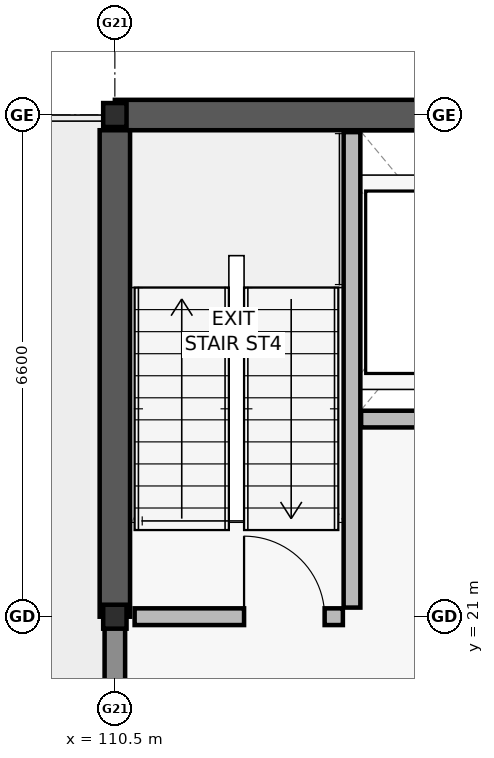
"""IFC4 building model, lengths in metres.
Left out: names, types, materials, properties, quantities, classifications, styles, units other than length and angle.
Written with IfcOpenShell. Run it as: python <this file> out.ifc"""

import sys

from ifc_helpers import new_model, si_unit, direction, frame, frame_2d, origin, origin_2d, place, context, subcontext, project, spatial, rectangle, i_section, extrude, element, fill, save


model = new_model("IFC4")
c1 = context("Model", 3, precision=1e-05, world=origin(), true_north=direction((0.0, 1.0)))
c2 = subcontext(c1, "Body", "Model", "MODEL_VIEW")
j1 = project(units=[si_unit("LENGTHUNIT", "METRE"), si_unit("PLANEANGLEUNIT", "RADIAN")], contexts=[c1])
p1 = place(None, origin())
s1 = spatial("IfcSite", under=j1, at=p1, CompositionType="ELEMENT")
p2 = place(p1, origin())
s2 = spatial("IfcBuilding", under=s1, at=p2, CompositionType="ELEMENT")
p3 = place(p2, frame((0.0, 0.0, 13.5)))
s3 = spatial("IfcBuildingStorey", under=s2, at=p3, CompositionType="ELEMENT", Elevation=13.5)
for number, where, z_axis, x_axis in (
    (1, (110.5, 21.0, 0.0), (0.0, 0.0, 1.0), (1.0, 0.0, 0.0)),
    (2, (110.5, 27.6, 0.0), (0.0, 0.0, 1.0), (1.0, 0.0, 0.0)),
):
    element("IfcColumn", number, at=place(p3, frame(where, z_axis=z_axis, x_axis=x_axis)), inside=s3, PredefinedType="COLUMN", context=c2, shape_type="SweptSolid", body=[
        extrude(i_section(OverallWidth=0.307, OverallDepth=0.315, WebThickness=0.012, FlangeThickness=0.019, FilletRadius=0.017, at=origin_2d()), origin(), (0.0, 0.0, 1.0), 3.9),
    ])
p4 = place(p3, frame((110.5, 27.6, 0.0), z_axis=(0.0, 0.0, 1.0), x_axis=(1.0, 0.0, 0.0)))
e3 = element("IfcWall", 3, at=p4, inside=s3, PredefinedType="SHEAR", context=c2, shape_type="SweptSolid", body=[
    extrude(rectangle(XDim=6.5, YDim=0.4, at=frame_2d((3.25, 0.0))), origin(), (0.0, 0.0, 1.0), 3.66),
])
p5 = place(p3, frame((110.5, 21.0, 0.0), z_axis=(0.0, 0.0, 1.0), x_axis=(0.0, 1.0, 0.0)))
e4 = element("IfcWall", 4, at=p5, inside=s3, PredefinedType="SHEAR", context=c2, shape_type="SweptSolid", body=[
    extrude(rectangle(XDim=6.4, YDim=0.4, at=frame_2d((3.2, 0.0))), origin(), (0.0, 0.0, 1.0), 3.66),
])
p6 = place(p3, frame((110.5, 14.405, 0.0), z_axis=(0.0, 0.0, 1.0), x_axis=(0.0, 1.0, 0.0)))
e5 = element("IfcWall", 5, at=p6, inside=s3, PredefinedType="SOLIDWALL", context=c2, shape_type="SweptSolid", body=[
    extrude(rectangle(XDim=6.59, YDim=0.27, at=frame_2d((3.295, 0.0))), origin(), (0.0, 0.0, 1.0), 3.02),
])
p7 = place(p6, frame((2.785, 0.0, 0.0)))
e6 = element("IfcOpeningElement", 6, at=p7, cuts=e5, PredefinedType="OPENING", context=c2, shape_type="SweptSolid", body=[
    extrude(rectangle(XDim=1.02, YDim=2.14, at=frame_2d((0.51, 1.07))), frame((0.0, 0.145, 0.0), z_axis=(0.0, -1.0, 0.0), x_axis=(1.0, 0.0, 0.0)), (0.0, 0.0, 1.0), 0.29),
])
p8 = place(p3, frame((113.62, 21.12, 0.0), z_axis=(0.0, 0.0, 1.0), x_axis=(0.0, 1.0, 0.0)))
e7 = element("IfcWall", 7, at=p8, inside=s3, PredefinedType="SOLIDWALL", context=c2, shape_type="SweptSolid", body=[
    extrude(rectangle(XDim=6.255, YDim=0.22, at=frame_2d((3.127, 0.0))), origin(), (0.0, 0.0, 1.0), 3.66),
])
p9 = place(p3, frame((110.76, 21.0, 0.0), z_axis=(0.0, 0.0, 1.0), x_axis=(1.0, 0.0, 0.0)))
e8 = element("IfcWall", 8, at=p9, inside=s3, PredefinedType="SOLIDWALL", context=c2, shape_type="SweptSolid", body=[
    extrude(rectangle(XDim=2.74, YDim=0.22, at=frame_2d((1.37, 0.0))), origin(), (0.0, 0.0, 1.0), 3.02),
])
p10 = place(p9, frame((1.44, 0.0, 0.0)))
e9 = element("IfcOpeningElement", 9, at=p10, cuts=e8, PredefinedType="OPENING", context=c2, shape_type="SweptSolid", body=[
    extrude(rectangle(XDim=1.06, YDim=2.1, at=frame_2d((0.53, 1.05))), frame((0.0, 0.12, 0.0), z_axis=(0.0, -1.0, 0.0), x_axis=(1.0, 0.0, 0.0)), (0.0, 0.0, 1.0), 0.24),
])
p11 = place(p3, frame((113.74, 23.6, 0.0), z_axis=(0.0, 0.0, 1.0), x_axis=(1.0, 0.0, 0.0)))
e10 = element("IfcWall", 10, at=p11, inside=s3, PredefinedType="SOLIDWALL", context=c2, shape_type="SweptSolid", body=[
    extrude(rectangle(XDim=3.035, YDim=0.22, at=frame_2d((1.518, 0.0))), origin(), (0.0, 0.0, 1.0), 3.66),
])
p12 = place(p11, frame((0.968, 0.0, 0.0)))
e11 = element("IfcOpeningElement", 11, at=p12, cuts=e10, PredefinedType="OPENING", context=c2, shape_type="SweptSolid", body=[
    extrude(rectangle(XDim=1.1, YDim=2.1, at=frame_2d((0.55, 1.05))), frame((0.0, 0.12, 0.0), z_axis=(0.0, -1.0, 0.0), x_axis=(1.0, 0.0, 0.0)), (0.0, 0.0, 1.0), 0.24),
])
p13 = place(p10, origin())
e12 = element("IfcDoor", 12, at=p13, inside=s3, OperationType="SINGLE_SWING_LEFT", PredefinedType="DOOR", context=c2, shape_type="SweptSolid", body=[
    extrude(rectangle(XDim=1.06, YDim=2.1, at=frame_2d((0.53, 1.05))), frame((0.0, 0.025, 0.0), z_axis=(0.0, -1.0, 0.0), x_axis=(1.0, 0.0, 0.0)), (0.0, 0.0, 1.0), 0.05),
])
fill(e9, e12)
save(model, sys.argv[1])
